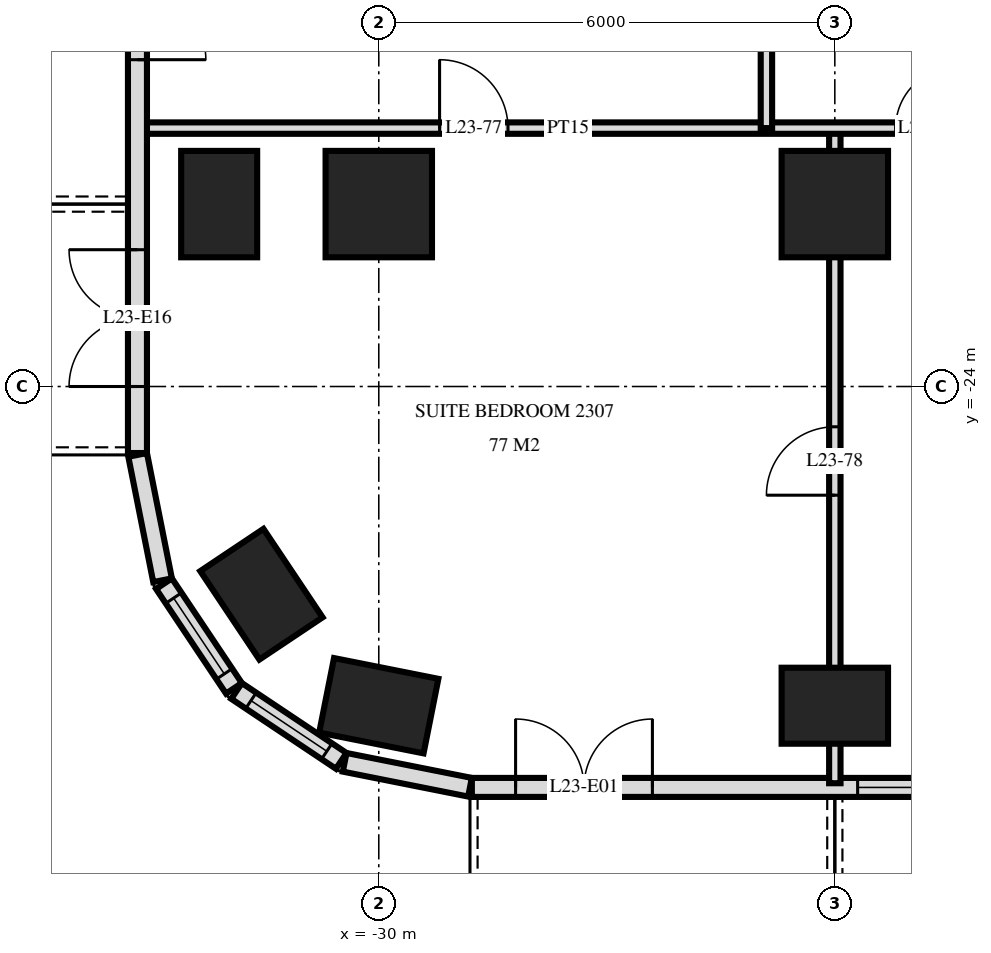
"""IFC4 building model, lengths in metres.
Left out: names, types, materials, properties, quantities, classifications, styles, units other than length and angle.
Written with IfcOpenShell. Run it as: python <this file> out.ifc"""

import sys

from ifc_helpers import new_model, si_unit, direction, frame, frame_2d, origin, origin_2d, place, context, subcontext, project, spatial, rectangle, extrude, element, fill, save


model = new_model("IFC4")
c1 = context("Model", 3, precision=1e-05, world=origin(), true_north=direction((0.0, 1.0)))
c2 = subcontext(c1, "Body", "Model", "MODEL_VIEW")
j1 = project(units=[si_unit("LENGTHUNIT", "METRE"), si_unit("PLANEANGLEUNIT", "RADIAN")], contexts=[c1])
p1 = place(None, origin())
s1 = spatial("IfcSite", under=j1, at=p1, CompositionType="ELEMENT")
p2 = place(p1, origin())
s2 = spatial("IfcBuilding", under=s1, at=p2, CompositionType="ELEMENT")
p3 = place(p2, frame((0.0, 0.0, 92.4)))
s3 = spatial("IfcBuildingStorey", under=s2, at=p3, CompositionType="ELEMENT", Elevation=92.4)
for number, where, z_axis, x_axis in (
    (1, (-32.1, -21.6, 0.0), (0.0, 0.0, 1.0), (0.0, 1.0, 0.0)),
    (2, (-31.544, -26.733, 0.0), (0.0, 0.0, 1.0), (-0.556, 0.831, 0.0)),
    (3, (-30.0, -28.2, 0.0), (0.0, 0.0, 1.0), (-0.981, 0.195, 0.0)),
):
    element("IfcColumn", number, at=place(p3, frame(where, z_axis=z_axis, x_axis=x_axis)), inside=s3, PredefinedType="COLUMN", context=c2, shape_type="SweptSolid", body=[
        extrude(rectangle(XDim=1.4, YDim=1.0, at=origin_2d()), origin(), (0.0, 0.0, 1.0), 3.6),
    ])
p4 = place(p3, frame((-30.0, -21.6, 0.0), z_axis=(0.0, 0.0, 1.0), x_axis=(1.0, 0.0, 0.0)))
e4 = element("IfcColumn", 4, at=p4, inside=s3, PredefinedType="COLUMN", context=c2, shape_type="SweptSolid", body=[
    extrude(rectangle(XDim=1.4, YDim=1.4, at=origin_2d()), origin(), (0.0, 0.0, 1.0), 3.6),
])
p5 = place(p3, frame((-24.0, -28.2, 0.0), z_axis=(0.0, 0.0, 1.0), x_axis=(1.0, 0.0, 0.0)))
e5 = element("IfcColumn", 5, at=p5, inside=s3, PredefinedType="COLUMN", context=c2, shape_type="SweptSolid", body=[
    extrude(rectangle(XDim=1.4, YDim=1.0, at=origin_2d()), origin(), (0.0, 0.0, 1.0), 3.6),
])
p6 = place(p3, frame((-24.0, -21.6, 0.0), z_axis=(0.0, 0.0, 1.0), x_axis=(1.0, 0.0, 0.0)))
e6 = element("IfcColumn", 6, at=p6, inside=s3, PredefinedType="COLUMN", context=c2, shape_type="SweptSolid", body=[
    extrude(rectangle(XDim=1.4, YDim=1.4, at=origin_2d()), origin(), (0.0, 0.0, 1.0), 3.6),
])
p7 = place(p3, frame((-33.175, -3.325, 0.0), z_axis=(0.0, 0.0, 1.0), x_axis=(0.0, -1.0, 0.0)))
e7 = element("IfcWall", 7, at=p7, inside=s3, PredefinedType="SOLIDWALL", context=c2, shape_type="SweptSolid", body=[
    extrude(rectangle(XDim=21.551, YDim=0.25, at=frame_2d((10.775, 0.0))), origin(), (0.0, 0.0, 1.0), 3.32),
])
p8 = place(p7, frame((7.025, 0.0, 0.0)))
e8 = element("IfcOpeningElement", 8, at=p8, cuts=e7, PredefinedType="OPENING", context=c2, shape_type="SweptSolid", body=[
    extrude(rectangle(XDim=1.8, YDim=2.4, at=frame_2d((0.9, 1.2))), frame((0.0, 0.135, 0.0), z_axis=(0.0, -1.0, 0.0), x_axis=(1.0, 0.0, 0.0)), (0.0, 0.0, 1.0), 0.27),
])
p9 = place(p7, frame((12.075, 0.0, 0.3)))
e9 = element("IfcOpeningElement", 9, at=p9, cuts=e7, PredefinedType="OPENING", context=c2, shape_type="SweptSolid", body=[
    extrude(rectangle(XDim=1.2, YDim=2.1, at=frame_2d((0.6, 1.05))), frame((0.0, 0.135, 0.0), z_axis=(0.0, -1.0, 0.0), x_axis=(1.0, 0.0, 0.0)), (0.0, 0.0, 1.0), 0.27),
])
p10 = place(p7, frame((14.575, 0.0, 0.0)))
e10 = element("IfcOpeningElement", 10, at=p10, cuts=e7, PredefinedType="OPENING", context=c2, shape_type="SweptSolid", body=[
    extrude(rectangle(XDim=1.8, YDim=2.4, at=frame_2d((0.9, 1.2))), frame((0.0, 0.135, 0.0), z_axis=(0.0, -1.0, 0.0), x_axis=(1.0, 0.0, 0.0)), (0.0, 0.0, 1.0), 0.27),
])
p11 = place(p7, frame((18.875, 0.0, 0.0)))
e11 = element("IfcOpeningElement", 11, at=p11, cuts=e7, PredefinedType="OPENING", context=c2, shape_type="SweptSolid", body=[
    extrude(rectangle(XDim=1.8, YDim=2.4, at=frame_2d((0.9, 1.2))), frame((0.0, 0.135, 0.0), z_axis=(0.0, -1.0, 0.0), x_axis=(1.0, 0.0, 0.0)), (0.0, 0.0, 1.0), 0.27),
])
p12 = place(p3, frame((-33.173, -24.9, 0.0), z_axis=(0.0, 0.0, 1.0), x_axis=(0.195166572128, -0.980770110232, 0.0)))
e12 = element("IfcWall", 12, at=p12, inside=s3, PredefinedType="SOLIDWALL", context=c2, shape_type="SweptSolid", body=[
    extrude(rectangle(XDim=1.681, YDim=0.25, at=frame_2d((0.841, 0.0))), origin(), (0.0, 0.0, 1.0), 3.32),
])
p13 = place(p3, frame((-32.826, -26.594, 0.0), z_axis=(0.0, 0.0, 1.0), x_axis=(0.55555029066, -0.831482937015, 0.0)))
e13 = element("IfcWall", 13, at=p13, inside=s3, PredefinedType="SOLIDWALL", context=c2, shape_type="SweptSolid", body=[
    extrude(rectangle(XDim=1.656, YDim=0.25, at=frame_2d((0.828, 0.0))), origin(), (0.0, 0.0, 1.0), 3.32),
])
p14 = place(p13, frame((0.228, 0.0, 0.9)))
e14 = element("IfcOpeningElement", 14, at=p14, cuts=e13, PredefinedType="OPENING", context=c2, shape_type="SweptSolid", body=[
    extrude(rectangle(XDim=1.2, YDim=1.5, at=frame_2d((0.6, 0.75))), frame((0.0, 0.135, 0.0), z_axis=(0.0, -1.0, 0.0), x_axis=(1.0, 0.0, 0.0)), (0.0, 0.0, 1.0), 0.27),
])
p15 = place(p3, frame((-31.871, -28.006, 0.0), z_axis=(0.0, 0.0, 1.0), x_axis=(0.831482937015, -0.55555029066, 0.0)))
e15 = element("IfcWall", 15, at=p15, inside=s3, PredefinedType="SOLIDWALL", context=c2, shape_type="SweptSolid", body=[
    extrude(rectangle(XDim=1.656, YDim=0.25, at=frame_2d((0.828, 0.0))), origin(), (0.0, 0.0, 1.0), 3.32),
])
p16 = place(p15, frame((0.228, 0.0, 0.9)))
e16 = element("IfcOpeningElement", 16, at=p16, cuts=e15, PredefinedType="OPENING", context=c2, shape_type="SweptSolid", body=[
    extrude(rectangle(XDim=1.2, YDim=1.5, at=frame_2d((0.6, 0.75))), frame((0.0, 0.135, 0.0), z_axis=(0.0, -1.0, 0.0), x_axis=(1.0, 0.0, 0.0)), (0.0, 0.0, 1.0), 0.27),
])
p17 = place(p3, frame((-30.449, -28.945, 0.0), z_axis=(0.0, 0.0, 1.0), x_axis=(0.980775640221, -0.19513878023, 0.0)))
e17 = element("IfcWall", 17, at=p17, inside=s3, PredefinedType="SOLIDWALL", context=c2, shape_type="SweptSolid", body=[
    extrude(rectangle(XDim=1.681, YDim=0.25, at=frame_2d((0.841, 0.0))), origin(), (0.0, 0.0, 1.0), 3.32),
])
p18 = place(p3, frame((-28.775, -29.275, 0.0), z_axis=(0.0, 0.0, 1.0), x_axis=(1.0, 0.0, 0.0)))
e18 = element("IfcWall", 18, at=p18, inside=s3, PredefinedType="SOLIDWALL", context=c2, shape_type="SweptSolid", body=[
    extrude(rectangle(XDim=57.551, YDim=0.25, at=frame_2d((28.775, 0.0))), origin(), (0.0, 0.0, 1.0), 3.32),
])
p19 = place(p18, frame((0.575, 0.0, 0.0)))
e19 = element("IfcOpeningElement", 19, at=p19, cuts=e18, PredefinedType="OPENING", context=c2, shape_type="SweptSolid", body=[
    extrude(rectangle(XDim=1.8, YDim=2.4, at=frame_2d((0.9, 1.2))), frame((0.0, 0.135, 0.0), z_axis=(0.0, -1.0, 0.0), x_axis=(1.0, 0.0, 0.0)), (0.0, 0.0, 1.0), 0.27),
])
p20 = place(p18, frame((5.075, 0.0, 0.3)))
e20 = element("IfcOpeningElement", 20, at=p20, cuts=e18, PredefinedType="OPENING", context=c2, shape_type="SweptSolid", body=[
    extrude(rectangle(XDim=2.4, YDim=2.1, at=frame_2d((1.2, 1.05))), frame((0.0, 0.135, 0.0), z_axis=(0.0, -1.0, 0.0), x_axis=(1.0, 0.0, 0.0)), (0.0, 0.0, 1.0), 0.27),
])
p21 = place(p18, frame((8.375, 0.0, 0.0)))
e21 = element("IfcOpeningElement", 21, at=p21, cuts=e18, PredefinedType="OPENING", context=c2, shape_type="SweptSolid", body=[
    extrude(rectangle(XDim=1.8, YDim=2.4, at=frame_2d((0.9, 1.2))), frame((0.0, 0.135, 0.0), z_axis=(0.0, -1.0, 0.0), x_axis=(1.0, 0.0, 0.0)), (0.0, 0.0, 1.0), 0.27),
])
p22 = place(p18, frame((11.375, 0.0, 0.0)))
e22 = element("IfcOpeningElement", 22, at=p22, cuts=e18, PredefinedType="OPENING", context=c2, shape_type="SweptSolid", body=[
    extrude(rectangle(XDim=1.8, YDim=2.4, at=frame_2d((0.9, 1.2))), frame((0.0, 0.135, 0.0), z_axis=(0.0, -1.0, 0.0), x_axis=(1.0, 0.0, 0.0)), (0.0, 0.0, 1.0), 0.27),
])
p23 = place(p18, frame((14.075, 0.0, 0.3)))
e23 = element("IfcOpeningElement", 23, at=p23, cuts=e18, PredefinedType="OPENING", context=c2, shape_type="SweptSolid", body=[
    extrude(rectangle(XDim=2.4, YDim=2.1, at=frame_2d((1.2, 1.05))), frame((0.0, 0.135, 0.0), z_axis=(0.0, -1.0, 0.0), x_axis=(1.0, 0.0, 0.0)), (0.0, 0.0, 1.0), 0.27),
])
p24 = place(p18, frame((17.375, 0.0, 0.0)))
e24 = element("IfcOpeningElement", 24, at=p24, cuts=e18, PredefinedType="OPENING", context=c2, shape_type="SweptSolid", body=[
    extrude(rectangle(XDim=1.8, YDim=2.4, at=frame_2d((0.9, 1.2))), frame((0.0, 0.135, 0.0), z_axis=(0.0, -1.0, 0.0), x_axis=(1.0, 0.0, 0.0)), (0.0, 0.0, 1.0), 0.27),
])
p25 = place(p18, frame((20.075, 0.0, 0.3)))
e25 = element("IfcOpeningElement", 25, at=p25, cuts=e18, PredefinedType="OPENING", context=c2, shape_type="SweptSolid", body=[
    extrude(rectangle(XDim=2.4, YDim=2.1, at=frame_2d((1.2, 1.05))), frame((0.0, 0.135, 0.0), z_axis=(0.0, -1.0, 0.0), x_axis=(1.0, 0.0, 0.0)), (0.0, 0.0, 1.0), 0.27),
])
p26 = place(p18, frame((23.075, 0.0, 0.3)))
e26 = element("IfcOpeningElement", 26, at=p26, cuts=e18, PredefinedType="OPENING", context=c2, shape_type="SweptSolid", body=[
    extrude(rectangle(XDim=2.4, YDim=2.1, at=frame_2d((1.2, 1.05))), frame((0.0, 0.135, 0.0), z_axis=(0.0, -1.0, 0.0), x_axis=(1.0, 0.0, 0.0)), (0.0, 0.0, 1.0), 0.27),
])
p27 = place(p18, frame((26.375, 0.0, 0.0)))
e27 = element("IfcOpeningElement", 27, at=p27, cuts=e18, PredefinedType="OPENING", context=c2, shape_type="SweptSolid", body=[
    extrude(rectangle(XDim=1.8, YDim=2.4, at=frame_2d((0.9, 1.2))), frame((0.0, 0.135, 0.0), z_axis=(0.0, -1.0, 0.0), x_axis=(1.0, 0.0, 0.0)), (0.0, 0.0, 1.0), 0.27),
])
p28 = place(p18, frame((29.375, 0.0, 0.0)))
e28 = element("IfcOpeningElement", 28, at=p28, cuts=e18, PredefinedType="OPENING", context=c2, shape_type="SweptSolid", body=[
    extrude(rectangle(XDim=1.8, YDim=2.4, at=frame_2d((0.9, 1.2))), frame((0.0, 0.135, 0.0), z_axis=(0.0, -1.0, 0.0), x_axis=(1.0, 0.0, 0.0)), (0.0, 0.0, 1.0), 0.27),
])
p29 = place(p18, frame((32.075, 0.0, 0.3)))
e29 = element("IfcOpeningElement", 29, at=p29, cuts=e18, PredefinedType="OPENING", context=c2, shape_type="SweptSolid", body=[
    extrude(rectangle(XDim=2.4, YDim=2.1, at=frame_2d((1.2, 1.05))), frame((0.0, 0.135, 0.0), z_axis=(0.0, -1.0, 0.0), x_axis=(1.0, 0.0, 0.0)), (0.0, 0.0, 1.0), 0.27),
])
p30 = place(p18, frame((35.375, 0.0, 0.0)))
e30 = element("IfcOpeningElement", 30, at=p30, cuts=e18, PredefinedType="OPENING", context=c2, shape_type="SweptSolid", body=[
    extrude(rectangle(XDim=1.8, YDim=2.4, at=frame_2d((0.9, 1.2))), frame((0.0, 0.135, 0.0), z_axis=(0.0, -1.0, 0.0), x_axis=(1.0, 0.0, 0.0)), (0.0, 0.0, 1.0), 0.27),
])
p31 = place(p18, frame((38.075, 0.0, 0.3)))
e31 = element("IfcOpeningElement", 31, at=p31, cuts=e18, PredefinedType="OPENING", context=c2, shape_type="SweptSolid", body=[
    extrude(rectangle(XDim=2.4, YDim=2.1, at=frame_2d((1.2, 1.05))), frame((0.0, 0.135, 0.0), z_axis=(0.0, -1.0, 0.0), x_axis=(1.0, 0.0, 0.0)), (0.0, 0.0, 1.0), 0.27),
])
p32 = place(p18, frame((41.075, 0.0, 0.3)))
e32 = element("IfcOpeningElement", 32, at=p32, cuts=e18, PredefinedType="OPENING", context=c2, shape_type="SweptSolid", body=[
    extrude(rectangle(XDim=2.4, YDim=2.1, at=frame_2d((1.2, 1.05))), frame((0.0, 0.135, 0.0), z_axis=(0.0, -1.0, 0.0), x_axis=(1.0, 0.0, 0.0)), (0.0, 0.0, 1.0), 0.27),
])
p33 = place(p18, frame((44.375, 0.0, 0.0)))
e33 = element("IfcOpeningElement", 33, at=p33, cuts=e18, PredefinedType="OPENING", context=c2, shape_type="SweptSolid", body=[
    extrude(rectangle(XDim=1.8, YDim=2.4, at=frame_2d((0.9, 1.2))), frame((0.0, 0.135, 0.0), z_axis=(0.0, -1.0, 0.0), x_axis=(1.0, 0.0, 0.0)), (0.0, 0.0, 1.0), 0.27),
])
p34 = place(p18, frame((47.075, 0.0, 0.3)))
e34 = element("IfcOpeningElement", 34, at=p34, cuts=e18, PredefinedType="OPENING", context=c2, shape_type="SweptSolid", body=[
    extrude(rectangle(XDim=2.4, YDim=2.1, at=frame_2d((1.2, 1.05))), frame((0.0, 0.135, 0.0), z_axis=(0.0, -1.0, 0.0), x_axis=(1.0, 0.0, 0.0)), (0.0, 0.0, 1.0), 0.27),
])
p35 = place(p18, frame((50.375, 0.0, 0.0)))
e35 = element("IfcOpeningElement", 35, at=p35, cuts=e18, PredefinedType="OPENING", context=c2, shape_type="SweptSolid", body=[
    extrude(rectangle(XDim=1.8, YDim=2.4, at=frame_2d((0.9, 1.2))), frame((0.0, 0.135, 0.0), z_axis=(0.0, -1.0, 0.0), x_axis=(1.0, 0.0, 0.0)), (0.0, 0.0, 1.0), 0.27),
])
p36 = place(p18, frame((53.375, 0.0, 0.0)))
e36 = element("IfcOpeningElement", 36, at=p36, cuts=e18, PredefinedType="OPENING", context=c2, shape_type="SweptSolid", body=[
    extrude(rectangle(XDim=1.8, YDim=2.4, at=frame_2d((0.9, 1.2))), frame((0.0, 0.135, 0.0), z_axis=(0.0, -1.0, 0.0), x_axis=(1.0, 0.0, 0.0)), (0.0, 0.0, 1.0), 0.27),
])
p37 = place(p3, frame((-24.0, -29.22, 0.0), z_axis=(0.0, 0.0, 1.0), x_axis=(0.0, 1.0, 0.0)))
e37 = element("IfcWall", 37, at=p37, inside=s3, PredefinedType="PARTITIONING", context=c2, shape_type="SweptSolid", body=[
    extrude(rectangle(XDim=8.62, YDim=0.15, at=frame_2d((4.31, 0.0))), origin(), (0.0, 0.0, 1.0), 3.32),
])
p38 = place(p37, frame((3.79, 0.0, 0.0)))
e38 = element("IfcOpeningElement", 38, at=p38, cuts=e37, PredefinedType="OPENING", context=c2, shape_type="SweptSolid", body=[
    extrude(rectangle(XDim=0.9, YDim=2.1, at=frame_2d((0.45, 1.05))), frame((0.0, 0.085, 0.0), z_axis=(0.0, -1.0, 0.0), x_axis=(1.0, 0.0, 0.0)), (0.0, 0.0, 1.0), 0.17),
])
p39 = place(p3, frame((-24.9, -20.6, 0.0), z_axis=(0.0, 0.0, 1.0), x_axis=(0.0, 1.0, 0.0)))
e39 = element("IfcWall", 39, at=p39, inside=s3, PredefinedType="PARTITIONING", context=c2, shape_type="SweptSolid", body=[
    extrude(rectangle(XDim=3.6, YDim=0.15, at=frame_2d((1.8, 0.0))), origin(), (0.0, 0.0, 1.0), 3.32),
])
p40 = place(p3, frame((-33.12, -20.6, 0.0), z_axis=(0.0, 0.0, 1.0), x_axis=(1.0, 0.0, 0.0)))
e40 = element("IfcWall", 40, at=p40, inside=s3, PredefinedType="PARTITIONING", context=c2, shape_type="SweptSolid", body=[
    extrude(rectangle(XDim=11.22, YDim=0.15, at=frame_2d((5.61, 0.0))), origin(), (0.0, 0.0, 1.0), 3.32),
])
p41 = place(p40, frame((9.92, 0.0, 0.0)))
e41 = element("IfcOpeningElement", 41, at=p41, cuts=e40, PredefinedType="OPENING", context=c2, shape_type="SweptSolid", body=[
    extrude(rectangle(XDim=0.8, YDim=2.1, at=frame_2d((0.4, 1.05))), frame((0.0, 0.085, 0.0), z_axis=(0.0, -1.0, 0.0), x_axis=(1.0, 0.0, 0.0)), (0.0, 0.0, 1.0), 0.17),
])
p42 = place(p40, frame((3.92, 0.0, 0.0)))
e42 = element("IfcOpeningElement", 42, at=p42, cuts=e40, PredefinedType="OPENING", context=c2, shape_type="SweptSolid", body=[
    extrude(rectangle(XDim=0.9, YDim=2.1, at=frame_2d((0.45, 1.05))), frame((0.0, 0.085, 0.0), z_axis=(0.0, -1.0, 0.0), x_axis=(1.0, 0.0, 0.0)), (0.0, 0.0, 1.0), 0.17),
])
p43 = place(p14, origin())
e43 = element("IfcWindow", 43, at=p43, inside=s3, PartitioningType="SINGLE_PANEL", PredefinedType="WINDOW", context=c2, shape_type="SweptSolid", body=[
    extrude(rectangle(XDim=1.2, YDim=1.5, at=frame_2d((0.6, 0.75))), frame((0.0, 0.03, 0.0), z_axis=(0.0, -1.0, 0.0), x_axis=(1.0, 0.0, 0.0)), (0.0, 0.0, 1.0), 0.06),
])
fill(e14, e43)
p44 = place(p16, origin())
e44 = element("IfcWindow", 44, at=p44, inside=s3, PartitioningType="SINGLE_PANEL", PredefinedType="WINDOW", context=c2, shape_type="SweptSolid", body=[
    extrude(rectangle(XDim=1.2, YDim=1.5, at=frame_2d((0.6, 0.75))), frame((0.0, 0.03, 0.0), z_axis=(0.0, -1.0, 0.0), x_axis=(1.0, 0.0, 0.0)), (0.0, 0.0, 1.0), 0.06),
])
fill(e16, e44)
p45 = place(p19, origin())
e45 = element("IfcDoor", 45, at=p45, inside=s3, OperationType="DOUBLE_DOOR_SINGLE_SWING", PredefinedType="DOOR", context=c2, shape_type="SweptSolid", body=[
    extrude(rectangle(XDim=1.8, YDim=2.4, at=frame_2d((0.9, 1.2))), frame((0.0, 0.025, 0.0), z_axis=(0.0, -1.0, 0.0), x_axis=(1.0, 0.0, 0.0)), (0.0, 0.0, 1.0), 0.05),
])
fill(e19, e45)
p46 = place(p20, origin())
e46 = element("IfcWindow", 46, at=p46, inside=s3, PartitioningType="SINGLE_PANEL", PredefinedType="WINDOW", context=c2, shape_type="SweptSolid", body=[
    extrude(rectangle(XDim=2.4, YDim=2.1, at=frame_2d((1.2, 1.05))), frame((0.0, 0.03, 0.0), z_axis=(0.0, -1.0, 0.0), x_axis=(1.0, 0.0, 0.0)), (0.0, 0.0, 1.0), 0.06),
])
fill(e20, e46)
p47 = place(p10, origin())
e47 = element("IfcDoor", 47, at=p47, inside=s3, OperationType="DOUBLE_DOOR_SINGLE_SWING", PredefinedType="DOOR", context=c2, shape_type="SweptSolid", body=[
    extrude(rectangle(XDim=1.8, YDim=2.4, at=frame_2d((0.9, 1.2))), frame((0.0, 0.025, 0.0), z_axis=(0.0, -1.0, 0.0), x_axis=(1.0, 0.0, 0.0)), (0.0, 0.0, 1.0), 0.05),
])
fill(e10, e47)
p48 = place(p11, frame((0.9, 0.0, 0.0), z_axis=(0.0, 0.0, 1.0), x_axis=(-1.0, 0.0, 0.0)))
e48 = element("IfcDoor", 48, at=p48, inside=s3, OperationType="DOUBLE_DOOR_SINGLE_SWING", PredefinedType="DOOR", context=c2, shape_type="SweptSolid", body=[
    extrude(rectangle(XDim=1.8, YDim=2.4, at=frame_2d((0.0, 1.2))), frame((0.0, -0.025, 0.0), z_axis=(0.0, 1.0, 0.0), x_axis=(-1.0, 0.0, 0.0)), (0.0, 0.0, 1.0), 0.05),
])
fill(e11, e48)
p49 = place(p41, origin())
e49 = element("IfcDoor", 49, at=p49, inside=s3, OperationType="SINGLE_SWING_LEFT", PredefinedType="DOOR", context=c2, shape_type="SweptSolid", body=[
    extrude(rectangle(XDim=0.8, YDim=2.1, at=frame_2d((0.4, 1.05))), frame((0.0, 0.025, 0.0), z_axis=(0.0, -1.0, 0.0), x_axis=(1.0, 0.0, 0.0)), (0.0, 0.0, 1.0), 0.05),
])
fill(e41, e49)
p50 = place(p42, origin())
e50 = element("IfcDoor", 50, at=p50, inside=s3, OperationType="SINGLE_SWING_RIGHT", PredefinedType="DOOR", context=c2, shape_type="SweptSolid", body=[
    extrude(rectangle(XDim=0.9, YDim=2.1, at=frame_2d((0.45, 1.05))), frame((0.0, 0.025, 0.0), z_axis=(0.0, -1.0, 0.0), x_axis=(1.0, 0.0, 0.0)), (0.0, 0.0, 1.0), 0.05),
])
fill(e42, e50)
p51 = place(p38, origin())
e51 = element("IfcDoor", 51, at=p51, inside=s3, OperationType="SINGLE_SWING_RIGHT", PredefinedType="DOOR", context=c2, shape_type="SweptSolid", body=[
    extrude(rectangle(XDim=0.9, YDim=2.1, at=frame_2d((0.45, 1.05))), frame((0.0, 0.025, 0.0), z_axis=(0.0, -1.0, 0.0), x_axis=(1.0, 0.0, 0.0)), (0.0, 0.0, 1.0), 0.05),
])
fill(e38, e51)
save(model, sys.argv[1])
